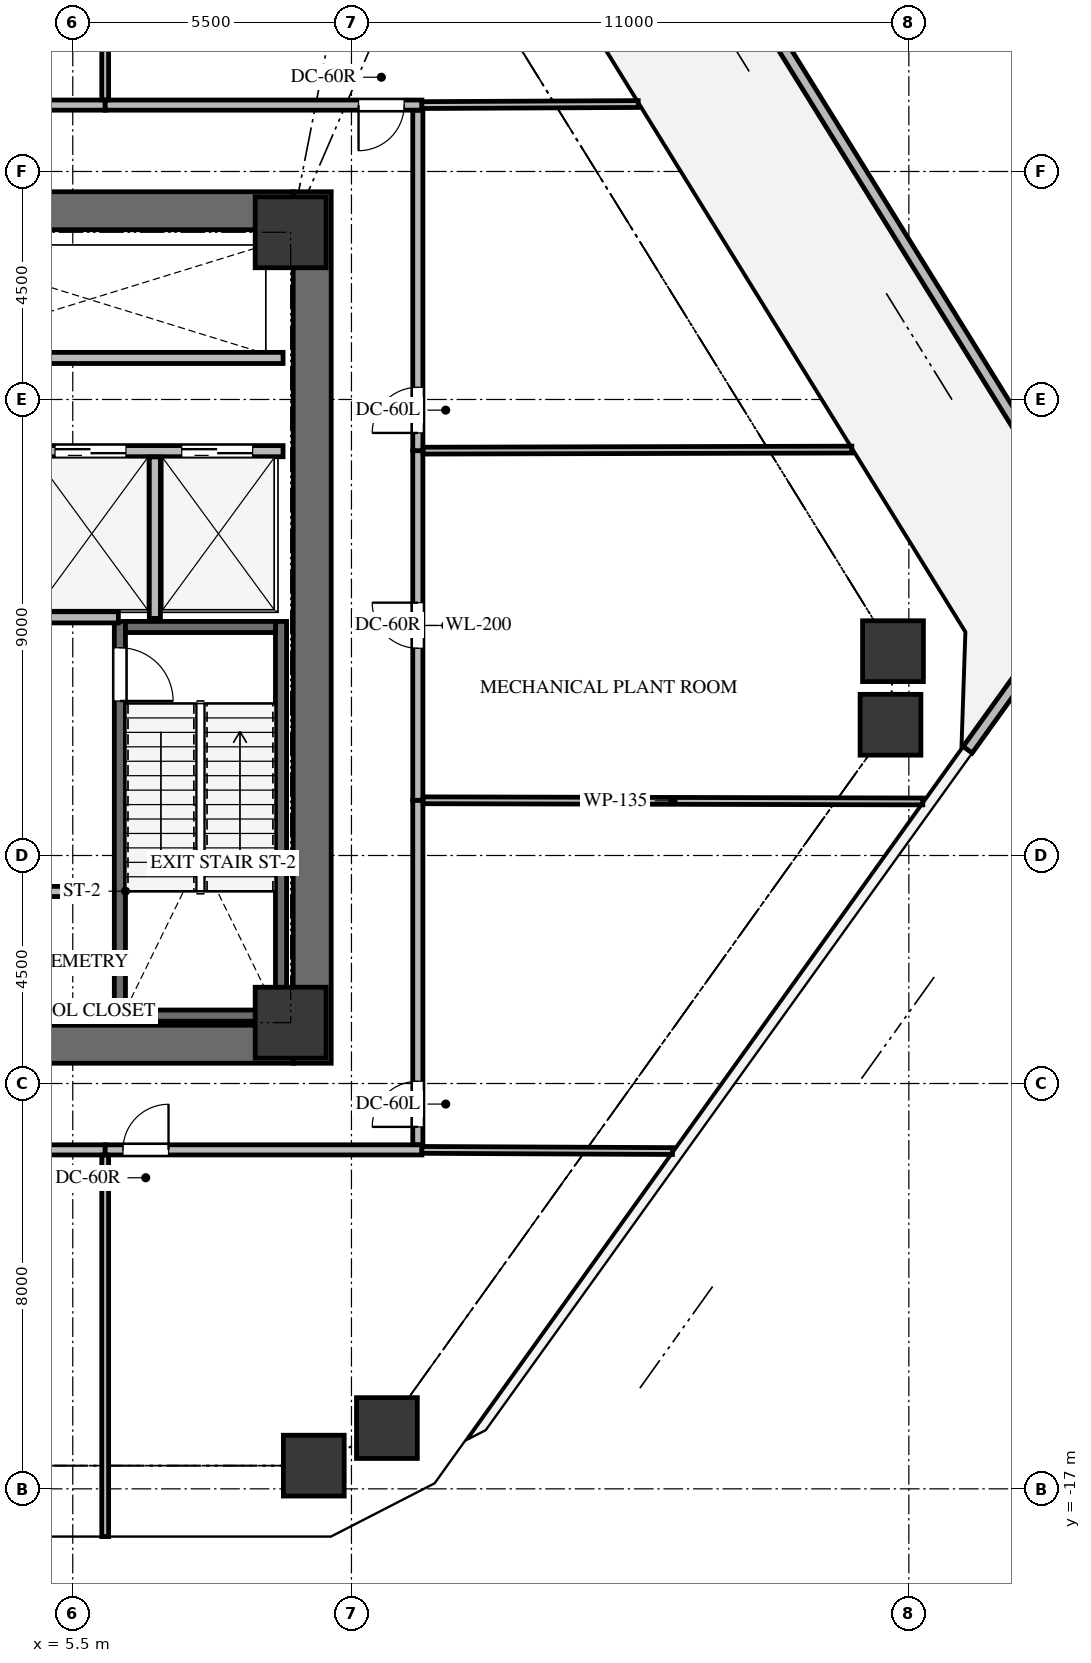
"""IFC4 building model, lengths in metres.
Left out: names, types, materials, properties, quantities, classifications, styles, units other than length and angle.
Written with IfcOpenShell. Run it as: python <this file> out.ifc"""

import sys

from ifc_helpers import new_model, si_unit, direction, frame, frame_2d, origin, origin_2d, place, context, subcontext, project, spatial, rectangle, extrude, source, transform, mapped, element, fill, save


model = new_model("IFC4")
c1 = context("Model", 3, precision=1e-05, world=origin(), true_north=direction((0.0, 1.0)))
c2 = subcontext(c1, "Body", "Model", "MODEL_VIEW")
j1 = project(units=[si_unit("LENGTHUNIT", "METRE"), si_unit("PLANEANGLEUNIT", "RADIAN")], contexts=[c1])
p1 = place(None, origin())
s1 = spatial("IfcSite", under=j1, at=p1, CompositionType="ELEMENT")
p2 = place(p1, origin())
s2 = spatial("IfcBuilding", under=s1, at=p2, CompositionType="ELEMENT")
p3 = place(p2, frame((0.0, 0.0, 150.3)))
s3 = spatial("IfcBuildingStorey", under=s2, at=p3, CompositionType="ELEMENT", Elevation=150.3)
p4 = place(p3, frame((10.225, -8.6, 0.0), z_axis=(0.0, 0.0, 1.0), x_axis=(0.0, 1.0, 0.0)))
e1 = element("IfcWall", 1, at=p4, inside=s3, PredefinedType="SHEAR", context=c2, shape_type="SweptSolid", body=[
    extrude(rectangle(XDim=17.2, YDim=0.75, at=frame_2d((8.6, 0.0))), origin(), (0.0, 0.0, 1.0), 4.8),
])
p5 = place(p3, frame((2.1, -8.225, 0.0), z_axis=(0.0, 0.0, 1.0), x_axis=(1.0, 0.0, 0.0)))
e2 = element("IfcWall", 2, at=p5, inside=s3, PredefinedType="SHEAR", context=c2, shape_type="SweptSolid", body=[
    extrude(rectangle(XDim=7.75, YDim=0.75, at=frame_2d((3.875, 0.0))), origin(), (0.0, 0.0, 1.0), 4.8),
])
p6 = place(p3, frame((-9.85, 8.225, 0.0), z_axis=(0.0, 0.0, 1.0), x_axis=(1.0, 0.0, 0.0)))
e3 = element("IfcWall", 3, at=p6, inside=s3, PredefinedType="SHEAR", context=c2, shape_type="SweptSolid", body=[
    extrude(rectangle(XDim=19.7, YDim=0.75, at=frame_2d((9.85, 0.0))), origin(), (0.0, 0.0, 1.0), 4.8),
])
p7 = place(p3, frame((9.61, -7.77, -0.32), z_axis=(0.0, 0.0, 1.0), x_axis=(0.0, 1.0, 0.0)))
e4 = element("IfcWall", 4, at=p7, inside=s3, PredefinedType="SHEAR", context=c2, shape_type="SweptSolid", body=[
    extrude(rectangle(XDim=7.89, YDim=0.22, at=frame_2d((3.945, 0.0))), origin(), (0.0, 0.0, 1.0), 4.8),
])
p8 = place(p3, frame((6.43, 0.12, -0.32), z_axis=(0.0, 0.0, 1.0), x_axis=(0.0, -1.0, 0.0)))
e5 = element("IfcWall", 5, at=p8, inside=s3, PredefinedType="SHEAR", context=c2, shape_type="SweptSolid", body=[
    extrude(rectangle(XDim=7.89, YDim=0.22, at=frame_2d((3.945, 0.0))), origin(), (0.0, 0.0, 1.0), 4.8),
])
p9 = place(p8, frame((0.52, 0.0, 0.0)))
e6 = element("IfcOpeningElement", 6, at=p9, cuts=e5, PredefinedType="OPENING", context=c2, shape_type="SweptSolid", body=[
    extrude(rectangle(XDim=1.05, YDim=2.15, at=frame_2d((0.525, 1.075))), frame((0.0, 0.12, 0.0), z_axis=(0.0, -1.0, 0.0), x_axis=(1.0, 0.0, 0.0)), (0.0, 0.0, 1.0), 0.24),
])
for number, where, z_axis, x_axis in (
    (7, (6.54, -7.66, -0.32), (0.0, 0.0, 1.0), (1.0, 0.0, 0.0)),
    (8, (9.5, 0.01, -0.32), (0.0, 0.0, 1.0), (-1.0, 0.0, 0.0)),
):
    element("IfcWall", number, at=place(p3, frame(where, z_axis=z_axis, x_axis=x_axis)), inside=s3, PredefinedType="SHEAR", context=c2, shape_type="SweptSolid", body=[
        extrude(rectangle(XDim=2.96, YDim=0.22, at=frame_2d((1.48, 0.0))), origin(), (0.0, 0.0, 1.0), 4.8),
    ])
m1 = source(origin(), c2, "Body", "SweptSolid", [
    extrude(rectangle(XDim=1.4, YDim=1.4, at=origin_2d()), origin(), (0.0, 0.0, 1.0), 4.8),
])
for number, where, z_axis, x_axis in (
    (9, (9.8, -7.8, -0.32), (0.0, 0.0, 1.0), (1.0, 0.0, 0.0)),
    (10, (9.8, 7.8, -0.32), (0.0, 0.0, 1.0), (1.0, 0.0, 0.0)),
):
    element("IfcColumn", number, at=place(p3, frame(where, z_axis=z_axis, x_axis=x_axis)), inside=s3, PredefinedType="COLUMN", context=c2, shape_type="MappedRepresentation", body=[
        mapped(m1, transform((0.0, 0.0, 0.0), x_axis=(1.0, 0.0, 0.0), y_axis=(0.0, 1.0, 0.0), z_axis=(0.0, 0.0, 1.0), scale=1.0)),
    ])
m2 = source(origin(), c2, "Body", "SweptSolid", [
    extrude(rectangle(XDim=1.2, YDim=1.2, at=origin_2d()), origin(), (0.0, 0.0, 1.0), 4.8),
])
for number, where, z_axis, x_axis in (
    (11, (21.687, -0.467, -0.32), (0.0, 0.0, 1.0), (1.0, 0.0, 0.0)),
    (12, (21.638, -1.92, -0.32), (0.0, 0.0, 1.0), (1.0, 0.0, 0.0)),
    (13, (11.7, -15.8, -0.32), (0.0, 0.0, 1.0), (1.0, 0.0, 0.0)),
    (14, (10.257, -16.542, -0.32), (0.0, 0.0, 1.0), (1.0, 0.0, 0.0)),
):
    element("IfcColumn", number, at=place(p3, frame(where, z_axis=z_axis, x_axis=x_axis)), inside=s3, PredefinedType="COLUMN", context=c2, shape_type="MappedRepresentation", body=[
        mapped(m2, transform((0.0, 0.0, 0.0), x_axis=(1.0, 0.0, 0.0), y_axis=(0.0, 1.0, 0.0), z_axis=(0.0, 0.0, 1.0), scale=1.0)),
    ])
p10 = place(p3, frame((14.612, 19.366, 0.0), z_axis=(0.0, 0.0, 1.0), x_axis=(0.527101579679, -0.849802285652, 0.0)))
e15 = element("IfcWall", 15, at=p10, inside=s3, PredefinedType="PARAPET", context=c2, shape_type="SweptSolid", body=[
    extrude(rectangle(XDim=19.866, YDim=0.22, at=frame_2d((9.933, 0.0))), origin(), (0.0, 0.0, 1.0), 1.2),
])
p11 = place(p3, frame((25.004, 0.152, 0.0), z_axis=(0.0, 0.0, 1.0), x_axis=(-0.583443386549, -0.812153812213, 0.0)))
e16 = element("IfcWall", 16, at=p11, inside=s3, PredefinedType="PARAPET", context=c2, shape_type="SweptSolid", body=[
    extrude(rectangle(XDim=3.16, YDim=0.22, at=frame_2d((1.58, 0.0))), origin(), (0.0, 0.0, 1.0), 1.2),
])
p12 = place(p3, frame((4.6, 3.48, 0.0), z_axis=(0.0, 0.0, 1.0), x_axis=(1.0, 0.0, 0.0)))
e17 = element("IfcWall", 17, at=p12, inside=s3, PredefinedType="SOLIDWALL", context=c2, shape_type="SweptSolid", body=[
    extrude(rectangle(XDim=5.05, YDim=0.22, at=frame_2d((2.525, 0.0))), origin(), (0.0, 0.0, 1.0), 4.465),
])
p13 = place(p12, frame((0.55, 0.0, 0.0)))
e18 = element("IfcOpeningElement", 18, at=p13, cuts=e17, PredefinedType="OPENING", context=c2, shape_type="SweptSolid", body=[
    extrude(rectangle(XDim=1.4, YDim=2.15, at=frame_2d((0.7, 1.075))), frame((0.0, 0.12, 0.0), z_axis=(0.0, -1.0, 0.0), x_axis=(1.0, 0.0, 0.0)), (0.0, 0.0, 1.0), 0.24),
])
p14 = place(p12, frame((3.05, 0.0, 0.0)))
e19 = element("IfcOpeningElement", 19, at=p14, cuts=e17, PredefinedType="OPENING", context=c2, shape_type="SweptSolid", body=[
    extrude(rectangle(XDim=1.4, YDim=2.15, at=frame_2d((0.7, 1.075))), frame((0.0, 0.12, 0.0), z_axis=(0.0, -1.0, 0.0), x_axis=(1.0, 0.0, 0.0)), (0.0, 0.0, 1.0), 0.24),
])
p15 = place(p3, frame((7.12, 0.18, 0.0), z_axis=(0.0, 0.0, 1.0), x_axis=(0.0, 1.0, 0.0)))
e20 = element("IfcWall", 20, at=p15, inside=s3, PredefinedType="SOLIDWALL", context=c2, shape_type="SweptSolid", body=[
    extrude(rectangle(XDim=3.186, YDim=0.22, at=frame_2d((1.593, 0.0))), origin(), (0.0, 0.0, 1.0), 4.465),
])
p16 = place(p3, frame((4.734, 0.2, 0.0), z_axis=(0.0, 0.0, 1.0), x_axis=(1.0, 0.0, 0.0)))
e21 = element("IfcWall", 21, at=p16, inside=s3, PredefinedType="SOLIDWALL", context=c2, shape_type="SweptSolid", body=[
    extrude(rectangle(XDim=1.666, YDim=0.22, at=frame_2d((0.833, 0.0))), origin(), (0.0, 0.0, 1.0), 4.465),
])
p17 = place(p3, frame((2.325, 5.32, 0.0), z_axis=(0.0, 0.0, 1.0), x_axis=(1.0, 0.0, 0.0)))
e22 = element("IfcWall", 22, at=p17, inside=s3, PredefinedType="SOLIDWALL", context=c2, shape_type="SweptSolid", body=[
    extrude(rectangle(XDim=7.325, YDim=0.22, at=frame_2d((3.663, 0.0))), origin(), (0.0, 0.0, 1.0), 4.465),
])
p18 = place(p3, frame((2.51, -5.21, 0.0), z_axis=(0.0, 0.0, 1.0), x_axis=(1.0, 0.0, 0.0)))
e23 = element("IfcWall", 23, at=p18, inside=s3, PredefinedType="SOLIDWALL", context=c2, shape_type="SweptSolid", body=[
    extrude(rectangle(XDim=3.53, YDim=0.2, at=frame_2d((1.765, 0.0))), origin(), (0.0, 0.0, 1.0), 4.465),
])
p19 = place(p18, frame((1.315, 0.0, 0.0)))
e24 = element("IfcOpeningElement", 24, at=p19, cuts=e23, PredefinedType="OPENING", context=c2, shape_type="SweptSolid", body=[
    extrude(rectangle(XDim=0.9, YDim=2.05, at=frame_2d((0.45, 1.025))), frame((0.0, 0.11, 0.0), z_axis=(0.0, -1.0, 0.0), x_axis=(1.0, 0.0, 0.0)), (0.0, 0.0, 1.0), 0.22),
])
p20 = place(p3, frame((6.14, 10.31, 0.0), z_axis=(0.0, 0.0, 1.0), x_axis=(-1.0, 0.0, 0.0)))
e25 = element("IfcWall", 25, at=p20, inside=s3, PredefinedType="SOLIDWALL", context=c2, shape_type="SweptSolid", body=[
    extrude(rectangle(XDim=6.1, YDim=0.2, at=frame_2d((3.05, 0.0))), origin(), (0.0, 0.0, 1.0), 4.028),
])
p21 = place(p20, frame((2.6, 0.0, 0.0)))
e26 = element("IfcOpeningElement", 26, at=p21, cuts=e25, PredefinedType="OPENING", context=c2, shape_type="SweptSolid", body=[
    extrude(rectangle(XDim=0.9, YDim=2.05, at=frame_2d((0.45, 1.025))), frame((0.0, 0.11, 0.0), z_axis=(0.0, -1.0, 0.0), x_axis=(1.0, 0.0, 0.0)), (0.0, 0.0, 1.0), 0.22),
])
p22 = place(p3, frame((12.39, 10.31, 0.0), z_axis=(0.0, 0.0, 1.0), x_axis=(-1.0, 0.0, 0.0)))
e27 = element("IfcWall", 27, at=p22, inside=s3, PredefinedType="SOLIDWALL", context=c2, shape_type="SweptSolid", body=[
    extrude(rectangle(XDim=6.25, YDim=0.2, at=frame_2d((3.125, 0.0))), origin(), (0.0, 0.0, 1.0), 3.662),
])
p23 = place(p22, frame((0.35, 0.0, 0.0)))
e28 = element("IfcOpeningElement", 28, at=p23, cuts=e27, PredefinedType="OPENING", context=c2, shape_type="SweptSolid", body=[
    extrude(rectangle(XDim=0.9, YDim=2.05, at=frame_2d((0.45, 1.025))), frame((0.0, 0.11, 0.0), z_axis=(0.0, -1.0, 0.0), x_axis=(1.0, 0.0, 0.0)), (0.0, 0.0, 1.0), 0.22),
])
p24 = place(p3, frame((0.04, -10.31, 0.0), z_axis=(0.0, 0.0, 1.0), x_axis=(1.0, 0.0, 0.0)))
e29 = element("IfcWall", 29, at=p24, inside=s3, PredefinedType="SOLIDWALL", context=c2, shape_type="SweptSolid", body=[
    extrude(rectangle(XDim=6.1, YDim=0.2, at=frame_2d((3.05, 0.0))), origin(), (0.0, 0.0, 1.0), 3.662),
])
p25 = place(p24, frame((2.6, 0.0, 0.0)))
e30 = element("IfcOpeningElement", 30, at=p25, cuts=e29, PredefinedType="OPENING", context=c2, shape_type="SweptSolid", body=[
    extrude(rectangle(XDim=0.9, YDim=2.05, at=frame_2d((0.45, 1.025))), frame((0.0, 0.11, 0.0), z_axis=(0.0, -1.0, 0.0), x_axis=(1.0, 0.0, 0.0)), (0.0, 0.0, 1.0), 0.22),
])
p26 = place(p3, frame((6.14, -10.31, 0.0), z_axis=(0.0, 0.0, 1.0), x_axis=(1.0, 0.0, 0.0)))
e31 = element("IfcWall", 31, at=p26, inside=s3, PredefinedType="SOLIDWALL", context=c2, shape_type="SweptSolid", body=[
    extrude(rectangle(XDim=6.25, YDim=0.2, at=frame_2d((3.125, 0.0))), origin(), (0.0, 0.0, 1.0), 4.465),
])
p27 = place(p26, frame((0.35, 0.0, 0.0)))
e32 = element("IfcOpeningElement", 32, at=p27, cuts=e31, PredefinedType="OPENING", context=c2, shape_type="SweptSolid", body=[
    extrude(rectangle(XDim=0.9, YDim=2.05, at=frame_2d((0.45, 1.025))), frame((0.0, 0.11, 0.0), z_axis=(0.0, -1.0, 0.0), x_axis=(1.0, 0.0, 0.0)), (0.0, 0.0, 1.0), 0.22),
])
p28 = place(p3, frame((12.31, -10.206, 0.0), z_axis=(0.0, 0.0, 1.0), x_axis=(0.0, 1.0, 0.0)))
e33 = element("IfcWall", 33, at=p28, inside=s3, PredefinedType="SOLIDWALL", context=c2, shape_type="SweptSolid", body=[
    extrude(rectangle(XDim=6.796, YDim=0.2, at=frame_2d((3.398, 0.0))), origin(), (0.0, 0.0, 1.0), 4.465),
])
p29 = place(p28, frame((0.35, 0.0, 0.0)))
e34 = element("IfcOpeningElement", 34, at=p29, cuts=e33, PredefinedType="OPENING", context=c2, shape_type="SweptSolid", body=[
    extrude(rectangle(XDim=0.9, YDim=2.05, at=frame_2d((0.45, 1.025))), frame((0.0, 0.11, 0.0), z_axis=(0.0, -1.0, 0.0), x_axis=(1.0, 0.0, 0.0)), (0.0, 0.0, 1.0), 0.22),
])
p30 = place(p3, frame((12.31, -3.41, 0.0), z_axis=(0.0, 0.0, 1.0), x_axis=(0.0, 1.0, 0.0)))
e35 = element("IfcWall", 35, at=p30, inside=s3, PredefinedType="SOLIDWALL", context=c2, shape_type="SweptSolid", body=[
    extrude(rectangle(XDim=6.9, YDim=0.2, at=frame_2d((3.45, 0.0))), origin(), (0.0, 0.0, 1.0), 3.662),
])
p31 = place(p30, frame((3.0, 0.0, 0.0)))
e36 = element("IfcOpeningElement", 36, at=p31, cuts=e35, PredefinedType="OPENING", context=c2, shape_type="SweptSolid", body=[
    extrude(rectangle(XDim=0.9, YDim=2.05, at=frame_2d((0.45, 1.025))), frame((0.0, 0.11, 0.0), z_axis=(0.0, -1.0, 0.0), x_axis=(1.0, 0.0, 0.0)), (0.0, 0.0, 1.0), 0.22),
])
p32 = place(p3, frame((12.31, 3.49, 0.0), z_axis=(0.0, 0.0, 1.0), x_axis=(0.0, 1.0, 0.0)))
e37 = element("IfcWall", 37, at=p32, inside=s3, PredefinedType="SOLIDWALL", context=c2, shape_type="SweptSolid", body=[
    extrude(rectangle(XDim=6.716, YDim=0.2, at=frame_2d((3.358, 0.0))), origin(), (0.0, 0.0, 1.0), 4.465),
])
p33 = place(p32, frame((0.35, 0.0, 0.0)))
e38 = element("IfcOpeningElement", 38, at=p33, cuts=e37, PredefinedType="OPENING", context=c2, shape_type="SweptSolid", body=[
    extrude(rectangle(XDim=0.9, YDim=2.05, at=frame_2d((0.45, 1.025))), frame((0.0, 0.11, 0.0), z_axis=(0.0, -1.0, 0.0), x_axis=(1.0, 0.0, 0.0)), (0.0, 0.0, 1.0), 0.22),
])
p34 = place(p3, frame((6.14, 16.418, 0.0), z_axis=(0.0, 0.0, 1.0), x_axis=(0.0, -1.0, 0.0)))
e39 = element("IfcWall", 39, at=p34, inside=s3, PredefinedType="PARTITIONING", context=c2, shape_type="SweptSolid", body=[
    extrude(rectangle(XDim=6.004, YDim=0.135, at=frame_2d((3.002, 0.0))), origin(), (0.0, 0.0, 1.0), 3.819),
])
p35 = place(p3, frame((16.66, 10.331, 0.0), z_axis=(0.0, 0.0, 1.0), x_axis=(-0.999988189448, -0.004860140437, 0.0)))
e40 = element("IfcWall", 40, at=p35, inside=s3, PredefinedType="PARTITIONING", context=c2, shape_type="SweptSolid", body=[
    extrude(rectangle(XDim=4.27, YDim=0.135, at=frame_2d((2.135, 0.0))), origin(), (0.0, 0.0, 1.0), 3.819),
])
p36 = place(p3, frame((6.14, -10.414, 0.0), z_axis=(0.0, 0.0, 1.0), x_axis=(0.0, -1.0, 0.0)))
e41 = element("IfcWall", 41, at=p36, inside=s3, PredefinedType="PARTITIONING", context=c2, shape_type="SweptSolid", body=[
    extrude(rectangle(XDim=7.528, YDim=0.135, at=frame_2d((3.764, 0.0))), origin(), (0.0, 0.0, 1.0), 3.662),
])
p37 = place(p3, frame((12.39, -10.31, 0.0), z_axis=(0.0, 0.0, 1.0), x_axis=(0.999989234714, -0.004640092214, 0.0)))
e42 = element("IfcWall", 42, at=p37, inside=s3, PredefinedType="PARTITIONING", context=c2, shape_type="SweptSolid", body=[
    extrude(rectangle(XDim=4.946, YDim=0.135, at=frame_2d((2.473, 0.0))), origin(), (0.0, 0.0, 1.0), 3.819),
])
p38 = place(p3, frame((12.414, -3.41, 0.0), z_axis=(0.0, 0.0, 1.0), x_axis=(0.999997234449, -0.002351827927, 0.0)))
e43 = element("IfcWall", 43, at=p38, inside=s3, PredefinedType="PARTITIONING", context=c2, shape_type="SweptSolid", body=[
    extrude(rectangle(XDim=9.862, YDim=0.135, at=frame_2d((4.931, 0.0))), origin(), (0.0, 0.0, 1.0), 3.819),
])
p39 = place(p3, frame((12.414, 3.49, 0.0), z_axis=(0.0, 0.0, 1.0), x_axis=(0.999996991679, 0.002452882703, 0.0)))
e44 = element("IfcWall", 44, at=p39, inside=s3, PredefinedType="PARTITIONING", context=c2, shape_type="SweptSolid", body=[
    extrude(rectangle(XDim=8.46, YDim=0.135, at=frame_2d((4.23, 0.0))), origin(), (0.0, 0.0, 1.0), 3.819),
])
m3 = source(origin(), c2, "Body", "SweptSolid", [
    extrude(rectangle(XDim=1.05, YDim=2.15, at=frame_2d((0.525, 1.075))), frame((0.0, 0.025, 0.0), z_axis=(0.0, -1.0, 0.0), x_axis=(1.0, 0.0, 0.0)), (0.0, 0.0, 1.0), 0.05),
])
p40 = place(p9, origin())
e45 = element("IfcDoor", 45, at=p40, inside=s3, OperationType="SINGLE_SWING_RIGHT", PredefinedType="DOOR", context=c2, shape_type="MappedRepresentation", body=[
    mapped(m3, transform((0.0, 0.0, 0.0), x_axis=(1.0, 0.0, 0.0), y_axis=(0.0, 1.0, 0.0), z_axis=(0.0, 0.0, 1.0), scale=1.0)),
])
fill(e6, e45)
m4 = source(origin(), c2, "Body", "SweptSolid", [
    extrude(rectangle(XDim=1.4, YDim=2.15, at=frame_2d((0.7, 1.075))), frame((0.0, 0.025, 0.0), z_axis=(0.0, -1.0, 0.0), x_axis=(1.0, 0.0, 0.0)), (0.0, 0.0, 1.0), 0.05),
])
p41 = place(p13, origin())
e46 = element("IfcDoor", 46, at=p41, inside=s3, OperationType="DOUBLE_DOOR_SLIDING", PredefinedType="DOOR", context=c2, shape_type="MappedRepresentation", body=[
    mapped(m4, transform((0.0, 0.0, 0.0), x_axis=(1.0, 0.0, 0.0), y_axis=(0.0, 1.0, 0.0), z_axis=(0.0, 0.0, 1.0), scale=1.0)),
])
fill(e18, e46)
p42 = place(p14, origin())
e47 = element("IfcDoor", 47, at=p42, inside=s3, OperationType="DOUBLE_DOOR_SLIDING", PredefinedType="DOOR", context=c2, shape_type="MappedRepresentation", body=[
    mapped(m4, transform((0.0, 0.0, 0.0), x_axis=(1.0, 0.0, 0.0), y_axis=(0.0, 1.0, 0.0), z_axis=(0.0, 0.0, 1.0), scale=1.0)),
])
fill(e19, e47)
m5 = source(origin(), c2, "Body", "SweptSolid", [
    extrude(rectangle(XDim=0.9, YDim=2.05, at=frame_2d((0.45, 1.025))), frame((0.0, 0.025, 0.0), z_axis=(0.0, -1.0, 0.0), x_axis=(1.0, 0.0, 0.0)), (0.0, 0.0, 1.0), 0.05),
])
p43 = place(p23, origin())
e48 = element("IfcDoor", 48, at=p43, inside=s3, OperationType="SINGLE_SWING_RIGHT", PredefinedType="DOOR", context=c2, shape_type="MappedRepresentation", body=[
    mapped(m5, transform((0.0, 0.0, 0.0), x_axis=(1.0, 0.0, 0.0), y_axis=(0.0, 1.0, 0.0), z_axis=(0.0, 0.0, 1.0), scale=1.0)),
])
fill(e28, e48)
p44 = place(p27, origin())
e49 = element("IfcDoor", 49, at=p44, inside=s3, OperationType="SINGLE_SWING_RIGHT", PredefinedType="DOOR", context=c2, shape_type="MappedRepresentation", body=[
    mapped(m5, transform((0.0, 0.0, 0.0), x_axis=(1.0, 0.0, 0.0), y_axis=(0.0, 1.0, 0.0), z_axis=(0.0, 0.0, 1.0), scale=1.0)),
])
fill(e32, e49)
m6 = source(origin(), c2, "Body", "SweptSolid", [
    extrude(rectangle(XDim=0.9, YDim=2.05, at=frame_2d((0.45, 1.025))), frame((0.0, 0.025, 0.0), z_axis=(0.0, -1.0, 0.0), x_axis=(1.0, 0.0, 0.0)), (0.0, 0.0, 1.0), 0.05),
])
p45 = place(p29, origin())
e50 = element("IfcDoor", 50, at=p45, inside=s3, OperationType="SINGLE_SWING_LEFT", PredefinedType="DOOR", context=c2, shape_type="MappedRepresentation", body=[
    mapped(m6, transform((0.0, 0.0, 0.0), x_axis=(1.0, 0.0, 0.0), y_axis=(0.0, 1.0, 0.0), z_axis=(0.0, 0.0, 1.0), scale=1.0)),
])
fill(e34, e50)
p46 = place(p31, origin())
e51 = element("IfcDoor", 51, at=p46, inside=s3, OperationType="SINGLE_SWING_RIGHT", PredefinedType="DOOR", context=c2, shape_type="MappedRepresentation", body=[
    mapped(m5, transform((0.0, 0.0, 0.0), x_axis=(1.0, 0.0, 0.0), y_axis=(0.0, 1.0, 0.0), z_axis=(0.0, 0.0, 1.0), scale=1.0)),
])
fill(e36, e51)
p47 = place(p33, origin())
e52 = element("IfcDoor", 52, at=p47, inside=s3, OperationType="SINGLE_SWING_LEFT", PredefinedType="DOOR", context=c2, shape_type="MappedRepresentation", body=[
    mapped(m6, transform((0.0, 0.0, 0.0), x_axis=(1.0, 0.0, 0.0), y_axis=(0.0, 1.0, 0.0), z_axis=(0.0, 0.0, 1.0), scale=1.0)),
])
fill(e38, e52)
save(model, sys.argv[1])
